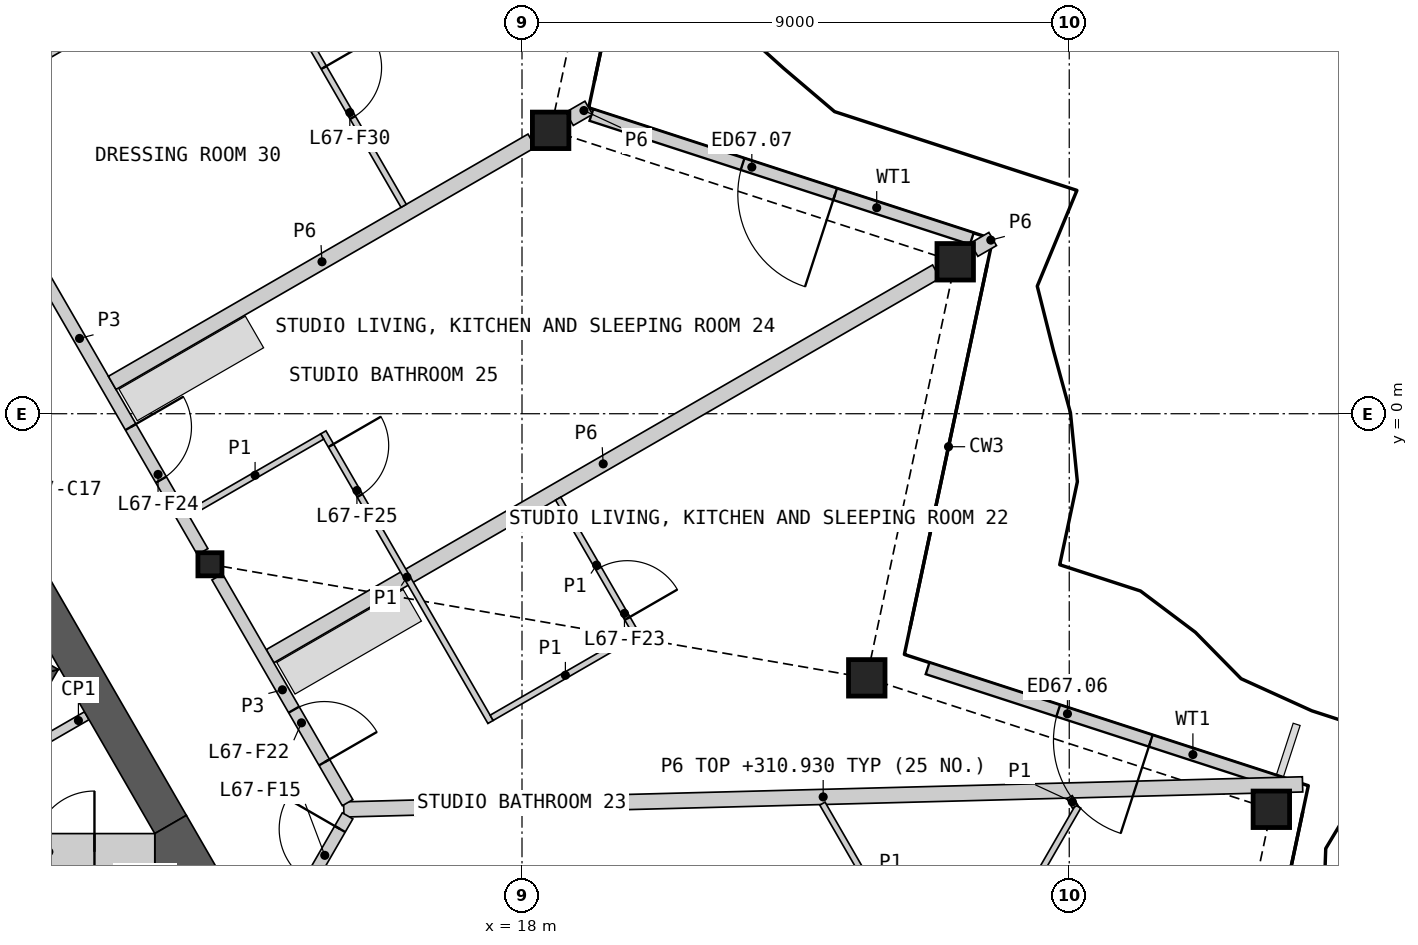
"""IFC4 building model, lengths in metres.
Left out: names, types, materials, properties, quantities, classifications, styles, units other than length and angle.
Written with IfcOpenShell. Run it as: python <this file> out.ifc"""

import sys

from ifc_helpers import new_model, si_unit, direction, frame, frame_2d, origin, origin_2d, place, context, subcontext, project, spatial, polyline, rectangle, hollow_rectangle, i_section, outline, extrude, element, fill, save


model = new_model("IFC4")
c1 = context("Model", 3, precision=1e-05, world=origin(), true_north=direction((0.0, 1.0)))
c2 = subcontext(c1, "Body", "Model", "MODEL_VIEW")
j1 = project(units=[si_unit("LENGTHUNIT", "METRE"), si_unit("PLANEANGLEUNIT", "RADIAN")], contexts=[c1])
p1 = place(None, origin())
s1 = spatial("IfcSite", under=j1, at=p1, CompositionType="ELEMENT")
p2 = place(p1, origin())
s2 = spatial("IfcBuilding", under=s1, at=p2, CompositionType="ELEMENT")
p3 = place(p2, frame((0.0, 0.0, 308.6)))
s3 = spatial("IfcBuildingStorey", under=s2, at=p3, CompositionType="ELEMENT", Elevation=308.6)
for number, where, z_axis, x_axis in (
    (1, (30.324, -6.506, 0.0), (0.0, 0.0, 1.0), (1.0, 0.0, 0.0)),
    (2, (23.67, -4.344, 0.0), (0.0, 0.0, 1.0), (1.0, 0.0, 0.0)),
    (3, (25.125, 2.499, 0.0), (0.0, 0.0, 1.0), (1.0, 0.0, 0.0)),
    (4, (18.471, 4.661, 0.0), (0.0, 0.0, 1.0), (1.0, 0.0, 0.0)),
):
    element("IfcColumn", number, at=place(p3, frame(where, z_axis=z_axis, x_axis=x_axis)), inside=s3, PredefinedType="COLUMN", context=c2, shape_type="SweptSolid", body=[
        extrude(hollow_rectangle(XDim=0.6, YDim=0.6, WallThickness=0.04, at=origin_2d()), origin(), (0.0, 0.0, 1.0), 3.4),
    ])
p4 = place(p3, frame((12.868, -2.476, 0.0), z_axis=(0.0, 0.0, 1.0), x_axis=(1.0, 0.0, 0.0)))
e5 = element("IfcColumn", 5, at=p4, inside=s3, PredefinedType="COLUMN", context=c2, shape_type="SweptSolid", body=[
    extrude(i_section(OverallWidth=0.396, OverallDepth=0.381, WebThickness=0.019, FlangeThickness=0.03, at=origin_2d()), origin(), (0.0, 0.0, 1.0), 3.4),
])
p5 = place(p3, frame((30.488, -6.078, 0.0), z_axis=(0.0, 0.0, 1.0), x_axis=(-0.951062515241, 0.308998530908, 0.0)))
e6 = element("IfcWall", 6, at=p5, inside=s3, PredefinedType="SOLIDWALL", context=c2, shape_type="SweptSolid", body=[
    extrude(rectangle(XDim=6.117, YDim=0.2, at=frame_2d((3.059, 0.0))), origin(), (0.0, 0.0, 1.0), 2.488),
])
p6 = place(p5, frame((2.259, 0.0, 0.0)))
e7 = element("IfcOpeningElement", 7, at=p6, cuts=e6, PredefinedType="OPENING", context=c2, shape_type="SweptSolid", body=[
    extrude(rectangle(XDim=1.6, YDim=2.25, at=frame_2d((0.8, 1.125))), frame((0.0, 0.11, 0.0), z_axis=(0.0, -1.0, 0.0), x_axis=(1.0, 0.0, 0.0)), (0.0, 0.0, 1.0), 0.22),
])
p7 = place(p3, frame((25.398, 2.88, 0.0), z_axis=(0.0, 0.0, 1.0), x_axis=(-0.95105697409, 0.309015585424, 0.0)))
e8 = element("IfcWall", 8, at=p7, inside=s3, PredefinedType="SOLIDWALL", context=c2, shape_type="SweptSolid", body=[
    extrude(rectangle(XDim=6.579, YDim=0.2, at=frame_2d((3.29, 0.0))), origin(), (0.0, 0.0, 1.0), 2.488),
])
p8 = place(p7, frame((2.364, 0.0, 0.0)))
e9 = element("IfcOpeningElement", 9, at=p8, cuts=e8, PredefinedType="OPENING", context=c2, shape_type="SweptSolid", body=[
    extrude(rectangle(XDim=1.6, YDim=2.25, at=frame_2d((0.8, 1.125))), frame((0.0, 0.11, 0.0), z_axis=(0.0, -1.0, 0.0), x_axis=(1.0, 0.0, 0.0)), (0.0, 0.0, 1.0), 0.22),
])
p9 = place(p3, origin())
e10 = element("IfcWall", 10, at=p9, inside=s3, PredefinedType="SHEAR", context=c2, shape_type="SweptSolid", body=[
    extrude(outline(polyline([(8.83, -6.881), (10.374, -4.206), (10.032, -4.298), (8.738, -6.539), (8.83, -6.881)])), origin(), (0.0, 0.0, 1.0), 3.1),
])
p10 = place(p3, origin())
e11 = element("IfcWall", 11, at=p10, inside=s3, PredefinedType="SHEAR", context=c2, shape_type="SweptSolid", body=[
    extrude(outline(polyline([(10.032, -4.298), (10.374, -4.206), (5.307, -1.281), (5.182, -1.498), (10.032, -4.298)])), origin(), (0.0, 0.0, 1.0), 3.1),
])
p11 = place(p3, frame((10.842, -4.967, 0.0), z_axis=(0.0, 0.0, 1.0), x_axis=(-0.866098216386, -0.499873863663, 0.0)))
e12 = element("IfcWall", 12, at=p11, inside=s3, PredefinedType="PARTITIONING", context=c2, shape_type="SweptSolid", body=[
    extrude(rectangle(XDim=1.582, YDim=0.15, at=frame_2d((0.791, 0.0))), origin(), (0.0, 0.0, 1.0), 3.1),
])
p12 = place(p3, frame((12.221, -6.756, 0.0), z_axis=(0.0, 0.0, 1.0), x_axis=(-0.500020646047, 0.866013483456, 0.0)))
e13 = element("IfcWall", 13, at=p12, inside=s3, PredefinedType="SHEAR", context=c2, shape_type="SweptSolid", body=[
    extrude(rectangle(XDim=4.559, YDim=0.6, at=frame_2d((2.28, 0.0))), origin(), (0.0, 0.0, 1.0), 3.1),
])
p13 = place(p3, origin())
e14 = element("IfcWall", 14, at=p13, inside=s3, PredefinedType="SHEAR", context=c2, shape_type="SweptSolid", body=[
    extrude(outline(polyline([(11.961, -7.506), (11.961, -6.906), (12.48, -6.606), (13.0, -7.506), (11.961, -7.506)])), origin(), (0.0, 0.0, 1.0), 3.1),
])
p14 = place(p3, frame((9.369, -7.206, 0.0), z_axis=(0.0, 0.0, 1.0), x_axis=(1.0, 0.0, 0.0)))
e15 = element("IfcWall", 15, at=p14, inside=s3, PredefinedType="SHEAR", context=c2, shape_type="SweptSolid", body=[
    extrude(rectangle(XDim=2.592, YDim=0.6, at=frame_2d((1.296, 0.0))), origin(), (0.0, 0.0, 1.0), 3.1),
])
p15 = place(p14, frame((0.6, 0.0, 0.0)))
e16 = element("IfcOpeningElement", 16, at=p15, cuts=e15, PredefinedType="OPENING", context=c2, shape_type="SweptSolid", body=[
    extrude(rectangle(XDim=1.0, YDim=2.1, at=frame_2d((0.5, 1.05))), frame((0.0, 0.31, 0.0), z_axis=(0.0, -1.0, 0.0), x_axis=(1.0, 0.0, 0.0)), (0.0, 0.0, 1.0), 0.62),
])
p16 = place(p3, frame((15.069, -6.509, 0.0), z_axis=(0.0, 0.0, 1.0), x_axis=(0.999657828615, 0.026157708023, 0.0)))
e17 = element("IfcWall", 17, at=p16, inside=s3, PredefinedType="PARTITIONING", context=c2, shape_type="SweptSolid", body=[
    extrude(rectangle(XDim=15.773, YDim=0.25, at=frame_2d((7.887, 0.0))), origin(), (0.0, 0.0, 1.0), 2.33),
])
p17 = place(p3, frame((13.856, -3.988, 0.0), z_axis=(0.0, 0.0, 1.0), x_axis=(0.866021406514, 0.500006923412, 0.0)))
e18 = element("IfcWall", 18, at=p17, inside=s3, PredefinedType="PARTITIONING", context=c2, shape_type="SweptSolid", body=[
    extrude(rectangle(XDim=12.654, YDim=0.25, at=frame_2d((6.327, 0.0))), origin(), (0.0, 0.0, 1.0), 2.33),
])
p18 = place(p3, frame((8.698, 4.745, 0.0), z_axis=(0.0, 0.0, 1.0), x_axis=(0.499984266882, -0.866034487114, 0.0)))
e19 = element("IfcWall", 19, at=p18, inside=s3, PredefinedType="PARTITIONING", context=c2, shape_type="SweptSolid", body=[
    extrude(rectangle(XDim=8.099, YDim=0.2, at=frame_2d((4.049, 0.0))), origin(), (0.0, 0.0, 1.0), 3.1),
])
p19 = place(p18, frame((5.732, 0.0, 0.0)))
e20 = element("IfcOpeningElement", 20, at=p19, cuts=e19, PredefinedType="OPENING", context=c2, shape_type="SweptSolid", body=[
    extrude(rectangle(XDim=1.0, YDim=2.1, at=frame_2d((0.5, 1.05))), frame((0.0, 0.11, 0.0), z_axis=(0.0, -1.0, 0.0), x_axis=(1.0, 0.0, 0.0)), (0.0, 0.0, 1.0), 0.22),
])
p20 = place(p3, frame((11.26, 0.507, 0.0), z_axis=(0.0, 0.0, 1.0), x_axis=(0.86602842894, 0.499994760241, 0.0)))
e21 = element("IfcWall", 21, at=p20, inside=s3, PredefinedType="PARTITIONING", context=c2, shape_type="SweptSolid", body=[
    extrude(rectangle(XDim=7.968, YDim=0.25, at=frame_2d((3.984, 0.0))), origin(), (0.0, 0.0, 1.0), 2.33),
])
p21 = place(p3, frame((12.988, -2.684, 0.0), z_axis=(0.0, 0.0, 1.0), x_axis=(0.500003406062, -0.866023437285, 0.0)))
e22 = element("IfcWall", 22, at=p21, inside=s3, PredefinedType="PARTITIONING", context=c2, shape_type="SweptSolid", body=[
    extrude(rectangle(XDim=4.288, YDim=0.2, at=frame_2d((2.144, 0.0))), origin(), (0.0, 0.0, 1.0), 3.1),
])
p22 = place(p21, frame((2.521, 0.0, 0.0)))
e23 = element("IfcOpeningElement", 23, at=p22, cuts=e22, PredefinedType="OPENING", context=c2, shape_type="SweptSolid", body=[
    extrude(rectangle(XDim=1.0, YDim=2.1, at=frame_2d((0.5, 1.05))), frame((0.0, 0.11, 0.0), z_axis=(0.0, -1.0, 0.0), x_axis=(1.0, 0.0, 0.0)), (0.0, 0.0, 1.0), 0.22),
])
p23 = place(p3, frame((13.293, -9.797, 0.0), z_axis=(0.0, 0.0, 1.0), x_axis=(0.499967746641, 0.866044024469, 0.0)))
e24 = element("IfcWall", 24, at=p23, inside=s3, PredefinedType="PARTITIONING", context=c2, shape_type="SweptSolid", body=[
    extrude(rectangle(XDim=3.676, YDim=0.2, at=frame_2d((1.838, 0.0))), origin(), (0.0, 0.0, 1.0), 3.1),
])
p24 = place(p23, frame((2.426, 0.0, 0.0)))
e25 = element("IfcOpeningElement", 25, at=p24, cuts=e24, PredefinedType="OPENING", context=c2, shape_type="SweptSolid", body=[
    extrude(rectangle(XDim=1.0, YDim=2.1, at=frame_2d((0.5, 1.05))), frame((0.0, 0.11, 0.0), z_axis=(0.0, -1.0, 0.0), x_axis=(1.0, 0.0, 0.0)), (0.0, 0.0, 1.0), 0.22),
])
p25 = place(p3, frame((18.781, 4.849, 0.0), z_axis=(0.0, 0.0, 1.0), x_axis=(0.86609656662, 0.499876722092, 0.0)))
e26 = element("IfcWall", 26, at=p25, inside=s3, PredefinedType="PARTITIONING", context=c2, shape_type="SweptSolid", body=[
    extrude(rectangle(XDim=0.365, YDim=0.25, at=frame_2d((0.183, 0.0))), origin(), (0.0, 0.0, 1.0), 2.33),
])
p26 = place(p3, frame((25.435, 2.697, 0.0), z_axis=(0.0, 0.0, 1.0), x_axis=(0.865851769275, 0.500300623268, 0.0)))
e27 = element("IfcWall", 27, at=p26, inside=s3, PredefinedType="PARTITIONING", context=c2, shape_type="SweptSolid", body=[
    extrude(rectangle(XDim=0.353, YDim=0.25, at=frame_2d((0.177, 0.0))), origin(), (0.0, 0.0, 1.0), 2.33),
])
p27 = place(p3, frame((8.786, 5.073, 0.0), z_axis=(0.0, 0.0, 1.0), x_axis=(0.86602139559, 0.500006942333, 0.0)))
e28 = element("IfcWall", 28, at=p27, inside=s3, PredefinedType="PARTITIONING", context=c2, shape_type="SweptSolid", body=[
    extrude(rectangle(XDim=12.505, YDim=0.1, at=frame_2d((6.252, 0.0))), origin(), (0.0, 0.0, 1.0), 2.33),
])
p28 = place(p27, frame((5.677, 0.0, 0.0)))
e29 = element("IfcOpeningElement", 29, at=p28, cuts=e28, PredefinedType="OPENING", context=c2, shape_type="SweptSolid", body=[
    extrude(rectangle(XDim=0.95, YDim=2.1, at=frame_2d((0.475, 1.05))), frame((0.0, 0.06, 0.0), z_axis=(0.0, -1.0, 0.0), x_axis=(1.0, 0.0, 0.0)), (0.0, 0.0, 1.0), 0.12),
])
p29 = place(p3, frame((23.183, -13.327, 0.0), z_axis=(0.0, 0.0, 1.0), x_axis=(0.499991741039, 0.866030172045, 0.0)))
e30 = element("IfcWall", 30, at=p29, inside=s3, PredefinedType="PARTITIONING", context=c2, shape_type="SweptSolid", body=[
    extrude(rectangle(XDim=7.927, YDim=0.1, at=frame_2d((3.963, 0.0))), origin(), (0.0, 0.0, 1.0), 2.33),
])
p30 = place(p29, frame((1.97, 0.0, 0.0)))
e31 = element("IfcOpeningElement", 31, at=p30, cuts=e30, PredefinedType="OPENING", context=c2, shape_type="SweptSolid", body=[
    extrude(rectangle(XDim=0.95, YDim=2.1, at=frame_2d((0.475, 1.05))), frame((0.0, 0.06, 0.0), z_axis=(0.0, -1.0, 0.0), x_axis=(1.0, 0.0, 0.0)), (0.0, 0.0, 1.0), 0.12),
])
p31 = place(p3, frame((14.733, -0.307, 0.0), z_axis=(0.0, 0.0, 1.0), x_axis=(0.499996545922, -0.866027397988, 0.0)))
e32 = element("IfcWall", 32, at=p31, inside=s3, PredefinedType="PARTITIONING", context=c2, shape_type="SweptSolid", body=[
    extrude(rectangle(XDim=5.5, YDim=0.1, at=frame_2d((2.75, 0.0))), origin(), (0.0, 0.0, 1.0), 2.33),
])
p32 = place(p31, frame((0.25, 0.0, 0.0)))
e33 = element("IfcOpeningElement", 33, at=p32, cuts=e32, PredefinedType="OPENING", context=c2, shape_type="SweptSolid", body=[
    extrude(rectangle(XDim=0.95, YDim=2.1, at=frame_2d((0.475, 1.05))), frame((0.0, 0.06, 0.0), z_axis=(0.0, -1.0, 0.0), x_axis=(1.0, 0.0, 0.0)), (0.0, 0.0, 1.0), 0.12),
])
p33 = place(p3, frame((13.546, 7.763, 0.0), z_axis=(0.0, 0.0, 1.0), x_axis=(0.500028620461, -0.866008879123, 0.0)))
e34 = element("IfcWall", 34, at=p33, inside=s3, PredefinedType="PARTITIONING", context=c2, shape_type="SweptSolid", body=[
    extrude(rectangle(XDim=5.016, YDim=0.1, at=frame_2d((2.508, 0.0))), origin(), (0.0, 0.0, 1.0), 2.33),
])
p34 = place(p33, frame((2.39, 0.0, 0.0)))
e35 = element("IfcOpeningElement", 35, at=p34, cuts=e34, PredefinedType="OPENING", context=c2, shape_type="SweptSolid", body=[
    extrude(rectangle(XDim=0.95, YDim=2.1, at=frame_2d((0.475, 1.05))), frame((0.0, 0.06, 0.0), z_axis=(0.0, -1.0, 0.0), x_axis=(1.0, 0.0, 0.0)), (0.0, 0.0, 1.0), 0.12),
])
p35 = place(p3, frame((22.941, -6.413, 0.0), z_axis=(0.0, 0.0, 1.0), x_axis=(0.500013199183, -0.866017783098, 0.0)))
e36 = element("IfcWall", 36, at=p35, inside=s3, PredefinedType="PARTITIONING", context=c2, shape_type="SweptSolid", body=[
    extrude(rectangle(XDim=3.077, YDim=0.1, at=frame_2d((1.539, 0.0))), origin(), (0.0, 0.0, 1.0), 2.33),
])
p36 = place(p3, frame((17.501, -5.001, 0.0), z_axis=(0.0, 0.0, 1.0), x_axis=(0.866034573852, 0.49998411664, 0.0)))
e37 = element("IfcWall", 37, at=p36, inside=s3, PredefinedType="PARTITIONING", context=c2, shape_type="SweptSolid", body=[
    extrude(rectangle(XDim=2.8, YDim=0.1, at=frame_2d((1.4, 0.0))), origin(), (0.0, 0.0, 1.0), 2.33),
])
p37 = place(p3, frame((18.595, -1.396, 0.0), z_axis=(0.0, 0.0, 1.0), x_axis=(0.499976333282, -0.866039067339, 0.0)))
e38 = element("IfcWall", 38, at=p37, inside=s3, PredefinedType="PARTITIONING", context=c2, shape_type="SweptSolid", body=[
    extrude(rectangle(XDim=2.525, YDim=0.1, at=frame_2d((1.262, 0.0))), origin(), (0.0, 0.0, 1.0), 2.33),
])
p38 = place(p37, frame((1.325, 0.0, 0.0)))
e39 = element("IfcOpeningElement", 39, at=p38, cuts=e38, PredefinedType="OPENING", context=c2, shape_type="SweptSolid", body=[
    extrude(rectangle(XDim=0.95, YDim=2.1, at=frame_2d((0.475, 1.05))), frame((0.0, 0.06, 0.0), z_axis=(0.0, -1.0, 0.0), x_axis=(1.0, 0.0, 0.0)), (0.0, 0.0, 1.0), 0.12),
])
p39 = place(p3, frame((12.506, -1.65, 0.0), z_axis=(0.0, 0.0, 1.0), x_axis=(0.866030925526, 0.499990435942, 0.0)))
e40 = element("IfcWall", 40, at=p39, inside=s3, PredefinedType="PARTITIONING", context=c2, shape_type="SweptSolid", body=[
    extrude(rectangle(XDim=2.55, YDim=0.1, at=frame_2d((1.275, 0.0))), origin(), (0.0, 0.0, 1.0), 2.33),
])
p40 = place(p3, frame((27.006, -6.306, 0.0), z_axis=(0.0, 0.0, 1.0), x_axis=(0.500074377092, -0.865982457891, 0.0)))
e41 = element("IfcWall", 41, at=p40, inside=s3, PredefinedType="PARTITIONING", context=c2, shape_type="SweptSolid", body=[
    extrude(rectangle(XDim=0.18, YDim=0.1, at=frame_2d((0.09, 0.0))), origin(), (0.0, 0.0, 1.0), 2.33),
])
p41 = place(p6, origin())
e42 = element("IfcDoor", 42, at=p41, inside=s3, OperationType="DOUBLE_DOOR_SINGLE_SWING", PredefinedType="DOOR", context=c2, shape_type="SweptSolid", body=[
    extrude(rectangle(XDim=1.6, YDim=2.25, at=frame_2d((0.8, 1.125))), frame((0.0, 0.025, 0.0), z_axis=(0.0, -1.0, 0.0), x_axis=(1.0, 0.0, 0.0)), (0.0, 0.0, 1.0), 0.05),
])
fill(e7, e42)
p42 = place(p8, origin())
e43 = element("IfcDoor", 43, at=p42, inside=s3, OperationType="DOUBLE_DOOR_SINGLE_SWING", PredefinedType="DOOR", context=c2, shape_type="SweptSolid", body=[
    extrude(rectangle(XDim=1.6, YDim=2.25, at=frame_2d((0.8, 1.125))), frame((0.0, 0.025, 0.0), z_axis=(0.0, -1.0, 0.0), x_axis=(1.0, 0.0, 0.0)), (0.0, 0.0, 1.0), 0.05),
])
fill(e9, e43)
p43 = place(p15, origin())
e44 = element("IfcDoor", 44, at=p43, inside=s3, OperationType="SINGLE_SWING_RIGHT", PredefinedType="DOOR", context=c2, shape_type="SweptSolid", body=[
    extrude(rectangle(XDim=1.0, YDim=2.1, at=frame_2d((0.5, 1.05))), frame((0.0, 0.055, 0.0), z_axis=(0.0, -1.0, 0.0), x_axis=(1.0, 0.0, 0.0)), (0.0, 0.0, 1.0), 0.05),
])
fill(e16, e44)
p44 = place(p24, origin())
e45 = element("IfcDoor", 45, at=p44, inside=s3, OperationType="SINGLE_SWING_RIGHT", PredefinedType="DOOR", context=c2, shape_type="SweptSolid", body=[
    extrude(rectangle(XDim=1.0, YDim=2.1, at=frame_2d((0.5, 1.05))), frame((0.0, 0.025, 0.0), z_axis=(0.0, -1.0, 0.0), x_axis=(1.0, 0.0, 0.0)), (0.0, 0.0, 1.0), 0.05),
])
fill(e25, e45)
p45 = place(p22, origin())
e46 = element("IfcDoor", 46, at=p45, inside=s3, OperationType="SINGLE_SWING_RIGHT", PredefinedType="DOOR", context=c2, shape_type="SweptSolid", body=[
    extrude(rectangle(XDim=1.0, YDim=2.1, at=frame_2d((0.5, 1.05))), frame((0.0, 0.025, 0.0), z_axis=(0.0, -1.0, 0.0), x_axis=(1.0, 0.0, 0.0)), (0.0, 0.0, 1.0), 0.05),
])
fill(e23, e46)
p46 = place(p38, origin())
e47 = element("IfcDoor", 47, at=p46, inside=s3, OperationType="SINGLE_SWING_RIGHT", PredefinedType="DOOR", context=c2, shape_type="SweptSolid", body=[
    extrude(rectangle(XDim=0.95, YDim=2.1, at=frame_2d((0.475, 1.05))), frame((0.0, 0.025, 0.0), z_axis=(0.0, -1.0, 0.0), x_axis=(1.0, 0.0, 0.0)), (0.0, 0.0, 1.0), 0.05),
])
fill(e39, e47)
p47 = place(p19, origin())
e48 = element("IfcDoor", 48, at=p47, inside=s3, OperationType="SINGLE_SWING_LEFT", PredefinedType="DOOR", context=c2, shape_type="SweptSolid", body=[
    extrude(rectangle(XDim=1.0, YDim=2.1, at=frame_2d((0.5, 1.05))), frame((0.0, 0.025, 0.0), z_axis=(0.0, -1.0, 0.0), x_axis=(1.0, 0.0, 0.0)), (0.0, 0.0, 1.0), 0.05),
])
fill(e20, e48)
p48 = place(p32, origin())
e49 = element("IfcDoor", 49, at=p48, inside=s3, OperationType="SINGLE_SWING_LEFT", PredefinedType="DOOR", context=c2, shape_type="SweptSolid", body=[
    extrude(rectangle(XDim=0.95, YDim=2.1, at=frame_2d((0.475, 1.05))), frame((0.0, 0.025, 0.0), z_axis=(0.0, -1.0, 0.0), x_axis=(1.0, 0.0, 0.0)), (0.0, 0.0, 1.0), 0.05),
])
fill(e33, e49)
p49 = place(p34, origin())
e50 = element("IfcDoor", 50, at=p49, inside=s3, OperationType="SINGLE_SWING_LEFT", PredefinedType="DOOR", context=c2, shape_type="SweptSolid", body=[
    extrude(rectangle(XDim=0.95, YDim=2.1, at=frame_2d((0.475, 1.05))), frame((0.0, 0.025, 0.0), z_axis=(0.0, -1.0, 0.0), x_axis=(1.0, 0.0, 0.0)), (0.0, 0.0, 1.0), 0.05),
])
fill(e35, e50)
save(model, sys.argv[1])
